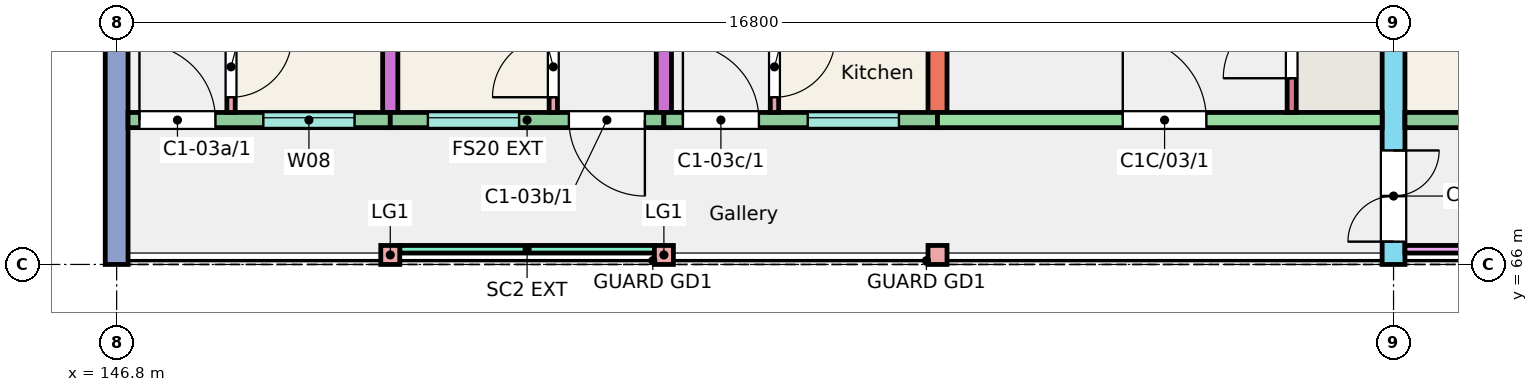
"""IFC4 building model, lengths in metres.
Left out: names, types, materials, properties, quantities, classifications, styles, units other than length and angle.
Written with IfcOpenShell. Run it as: python <this file> out.ifc"""

import sys

from ifc_helpers import new_model, si_unit, direction, frame, frame_2d, origin, origin_2d, place, context, subcontext, project, spatial, rectangle, extrude, element, fill, save


model = new_model("IFC4")
c1 = context("Model", 3, precision=1e-05, world=origin(), true_north=direction((0.0, 1.0)))
c2 = subcontext(c1, "Body", "Model", "MODEL_VIEW")
j1 = project(units=[si_unit("LENGTHUNIT", "METRE"), si_unit("PLANEANGLEUNIT", "RADIAN")], contexts=[c1])
p1 = place(None, origin())
s1 = spatial("IfcSite", under=j1, at=p1, CompositionType="ELEMENT")
p2 = place(p1, origin())
s2 = spatial("IfcBuilding", under=s1, at=p2, CompositionType="ELEMENT")
p3 = place(p2, frame((0.0, 0.0, 9.0)))
s3 = spatial("IfcBuildingStorey", under=s2, at=p3, CompositionType="ELEMENT", Elevation=9.0)
p4 = place(p3, frame((146.8, 66.0, 0.0), z_axis=(0.0, 0.0, 1.0), x_axis=(0.0, 1.0, 0.0)))
e1 = element("IfcWall", 1, at=p4, inside=s3, PredefinedType="SHEAR", context=c2, shape_type="SweptSolid", body=[
    extrude(rectangle(XDim=11.0, YDim=0.3, at=frame_2d((5.5, 0.0))), origin(), (0.0, 0.0, 1.0), 3.0),
])
p5 = place(p4, frame((7.805, 0.0, 0.9)))
e2 = element("IfcOpeningElement", 2, at=p5, cuts=e1, PredefinedType="OPENING", context=c2, shape_type="SweptSolid", body=[
    extrude(rectangle(XDim=1.8, YDim=1.5, at=frame_2d((0.9, 0.75))), frame((0.0, 0.16, 0.0), z_axis=(0.0, -1.0, 0.0), x_axis=(1.0, 0.0, 0.0)), (0.0, 0.0, 1.0), 0.32),
])
for number, where, z_axis, x_axis in (
    (3, (150.4, 68.0, 0.0), (0.0, 0.0, 1.0), (0.0, 1.0, 0.0)),
    (4, (154.0, 68.0, 0.0), (0.0, 0.0, 1.0), (0.0, 1.0, 0.0)),
):
    element("IfcWall", number, at=place(p3, frame(where, z_axis=z_axis, x_axis=x_axis)), inside=s3, PredefinedType="SHEAR", context=c2, shape_type="SweptSolid", body=[
        extrude(rectangle(XDim=9.0, YDim=0.2, at=frame_2d((4.5, 0.0))), origin(), (0.0, 0.0, 1.0), 3.0),
    ])
p6 = place(p3, frame((157.6, 68.0, 0.0), z_axis=(0.0, 0.0, 1.0), x_axis=(0.0, 1.0, 0.0)))
e5 = element("IfcWall", 5, at=p6, inside=s3, PredefinedType="SHEAR", context=c2, shape_type="SweptSolid", body=[
    extrude(rectangle(XDim=9.0, YDim=0.25, at=frame_2d((4.5, 0.0))), origin(), (0.0, 0.0, 1.0), 3.0),
])
p7 = place(p3, frame((163.6, 66.0, 0.0), z_axis=(0.0, 0.0, 1.0), x_axis=(0.0, 1.0, 0.0)))
e6 = element("IfcWall", 6, at=p7, inside=s3, PredefinedType="SHEAR", context=c2, shape_type="SweptSolid", body=[
    extrude(rectangle(XDim=11.0, YDim=0.3, at=frame_2d((5.5, 0.0))), origin(), (0.0, 0.0, 1.0), 3.0),
])
p8 = place(p7, frame((0.3, 0.0, 0.0)))
e7 = element("IfcOpeningElement", 7, at=p8, cuts=e6, PredefinedType="OPENING", context=c2, shape_type="SweptSolid", body=[
    extrude(rectangle(XDim=1.2, YDim=2.1, at=frame_2d((0.6, 1.05))), frame((0.0, 0.16, 0.0), z_axis=(0.0, -1.0, 0.0), x_axis=(1.0, 0.0, 0.0)), (0.0, 0.0, 1.0), 0.32),
])
p9 = place(p3, frame((146.95, 67.9, 0.0), z_axis=(0.0, 0.0, 1.0), x_axis=(1.0, 0.0, 0.0)))
e8 = element("IfcWall", 8, at=p9, inside=s3, PredefinedType="SOLIDWALL", context=c2, shape_type="SweptSolid", body=[
    extrude(rectangle(XDim=3.45, YDim=0.2, at=frame_2d((1.725, 0.0))), origin(), (0.0, 0.0, 1.0), 3.0),
])
p10 = place(p9, frame((1.78, 0.0, 1.1)))
e9 = element("IfcOpeningElement", 9, at=p10, cuts=e8, PredefinedType="OPENING", context=c2, shape_type="SweptSolid", body=[
    extrude(rectangle(XDim=1.2, YDim=1.3, at=frame_2d((0.6, 0.65))), frame((0.0, 0.11, 0.0), z_axis=(0.0, -1.0, 0.0), x_axis=(1.0, 0.0, 0.0)), (0.0, 0.0, 1.0), 0.22),
])
p11 = place(p9, frame((0.15, 0.0, 0.0)))
e10 = element("IfcOpeningElement", 10, at=p11, cuts=e8, PredefinedType="OPENING", context=c2, shape_type="SweptSolid", body=[
    extrude(rectangle(XDim=1.0, YDim=2.1, at=frame_2d((0.5, 1.05))), frame((0.0, 0.11, 0.0), z_axis=(0.0, -1.0, 0.0), x_axis=(1.0, 0.0, 0.0)), (0.0, 0.0, 1.0), 0.22),
])
p12 = place(p3, frame((150.4, 67.9, 0.0), z_axis=(0.0, 0.0, 1.0), x_axis=(1.0, 0.0, 0.0)))
e11 = element("IfcWall", 11, at=p12, inside=s3, PredefinedType="SOLIDWALL", context=c2, shape_type="SweptSolid", body=[
    extrude(rectangle(XDim=3.6, YDim=0.2, at=frame_2d((1.8, 0.0))), origin(), (0.0, 0.0, 1.0), 3.0),
])
p13 = place(p12, frame((0.495, 0.0, 1.1)))
e12 = element("IfcOpeningElement", 12, at=p13, cuts=e11, PredefinedType="OPENING", context=c2, shape_type="SweptSolid", body=[
    extrude(rectangle(XDim=1.2, YDim=1.3, at=frame_2d((0.6, 0.65))), frame((0.0, 0.11, 0.0), z_axis=(0.0, -1.0, 0.0), x_axis=(1.0, 0.0, 0.0)), (0.0, 0.0, 1.0), 0.22),
])
p14 = place(p12, frame((2.35, 0.0, 0.0)))
e13 = element("IfcOpeningElement", 13, at=p14, cuts=e11, PredefinedType="OPENING", context=c2, shape_type="SweptSolid", body=[
    extrude(rectangle(XDim=1.0, YDim=2.1, at=frame_2d((0.5, 1.05))), frame((0.0, 0.11, 0.0), z_axis=(0.0, -1.0, 0.0), x_axis=(1.0, 0.0, 0.0)), (0.0, 0.0, 1.0), 0.22),
])
p15 = place(p3, frame((154.0, 67.9, 0.0), z_axis=(0.0, 0.0, 1.0), x_axis=(1.0, 0.0, 0.0)))
e14 = element("IfcWall", 14, at=p15, inside=s3, PredefinedType="SOLIDWALL", context=c2, shape_type="SweptSolid", body=[
    extrude(rectangle(XDim=3.6, YDim=0.2, at=frame_2d((1.8, 0.0))), origin(), (0.0, 0.0, 1.0), 3.0),
])
p16 = place(p15, frame((1.893, 0.0, 1.1)))
e15 = element("IfcOpeningElement", 15, at=p16, cuts=e14, PredefinedType="OPENING", context=c2, shape_type="SweptSolid", body=[
    extrude(rectangle(XDim=1.2, YDim=1.3, at=frame_2d((0.6, 0.65))), frame((0.0, 0.11, 0.0), z_axis=(0.0, -1.0, 0.0), x_axis=(1.0, 0.0, 0.0)), (0.0, 0.0, 1.0), 0.22),
])
p17 = place(p15, frame((0.25, 0.0, 0.0)))
e16 = element("IfcOpeningElement", 16, at=p17, cuts=e14, PredefinedType="OPENING", context=c2, shape_type="SweptSolid", body=[
    extrude(rectangle(XDim=1.0, YDim=2.1, at=frame_2d((0.5, 1.05))), frame((0.0, 0.11, 0.0), z_axis=(0.0, -1.0, 0.0), x_axis=(1.0, 0.0, 0.0)), (0.0, 0.0, 1.0), 0.22),
])
p18 = place(p3, frame((157.6, 67.9, 0.0), z_axis=(0.0, 0.0, 1.0), x_axis=(1.0, 0.0, 0.0)))
e17 = element("IfcWall", 17, at=p18, inside=s3, PredefinedType="SHEAR", context=c2, shape_type="SweptSolid", body=[
    extrude(rectangle(XDim=5.85, YDim=0.2, at=frame_2d((2.925, 0.0))), origin(), (0.0, 0.0, 1.0), 3.0),
])
p19 = place(p18, frame((2.438, 0.0, 0.0)))
e18 = element("IfcOpeningElement", 18, at=p19, cuts=e17, PredefinedType="OPENING", context=c2, shape_type="SweptSolid", body=[
    extrude(rectangle(XDim=1.1, YDim=2.1, at=frame_2d((0.55, 1.05))), frame((0.0, 0.11, 0.0), z_axis=(0.0, -1.0, 0.0), x_axis=(1.0, 0.0, 0.0)), (0.0, 0.0, 1.0), 0.22),
])
p20 = place(p3, frame((162.26, 68.0, 0.0), z_axis=(0.0, 0.0, 1.0), x_axis=(0.0, 1.0, 0.0)))
e19 = element("IfcWall", 19, at=p20, inside=s3, PredefinedType="SHEAR", context=c2, shape_type="SweptSolid", body=[
    extrude(rectangle(XDim=1.72, YDim=0.12, at=frame_2d((0.86, 0.0))), origin(), (0.0, 0.0, 1.0), 3.0),
])
p21 = place(p20, frame((0.45, 0.0, 0.0)))
e20 = element("IfcOpeningElement", 20, at=p21, cuts=e19, PredefinedType="OPENING", context=c2, shape_type="SweptSolid", body=[
    extrude(rectangle(XDim=0.9, YDim=2.1, at=frame_2d((0.45, 1.05))), frame((0.0, 0.07, 0.0), z_axis=(0.0, -1.0, 0.0), x_axis=(1.0, 0.0, 0.0)), (0.0, 0.0, 1.0), 0.14),
])
p22 = place(p3, frame((163.75, 67.9, 0.0), z_axis=(0.0, 0.0, 1.0), x_axis=(1.0, 0.0, 0.0)))
e21 = element("IfcWall", 21, at=p22, inside=s3, PredefinedType="SOLIDWALL", context=c2, shape_type="SweptSolid", body=[
    extrude(rectangle(XDim=3.45, YDim=0.2, at=frame_2d((1.725, 0.0))), origin(), (0.0, 0.0, 1.0), 3.0),
])
p23 = place(p22, frame((0.925, 0.0, 0.9)))
e22 = element("IfcOpeningElement", 22, at=p23, cuts=e21, PredefinedType="OPENING", context=c2, shape_type="SweptSolid", body=[
    extrude(rectangle(XDim=1.5, YDim=1.5, at=frame_2d((0.75, 0.75))), frame((0.0, 0.11, 0.0), z_axis=(0.0, -1.0, 0.0), x_axis=(1.0, 0.0, 0.0)), (0.0, 0.0, 1.0), 0.22),
])
for number, where, z_axis, x_axis in (
    (23, (150.4, 66.125, 0.0), (0.0, 0.0, 1.0), (1.0, 0.0, 0.0)),
    (24, (154.0, 66.125, 0.0), (0.0, 0.0, 1.0), (1.0, 0.0, 0.0)),
    (25, (157.6, 66.125, 0.0), (0.0, 0.0, 1.0), (1.0, 0.0, 0.0)),
):
    element("IfcColumn", number, at=place(p3, frame(where, z_axis=z_axis, x_axis=x_axis)), inside=s3, PredefinedType="COLUMN", context=c2, shape_type="SweptSolid", body=[
        extrude(rectangle(XDim=0.25, YDim=0.25, at=origin_2d()), origin(), (0.0, 0.0, 1.0), 3.0),
    ])
p24 = place(p3, frame((150.525, 66.2, 0.0), z_axis=(0.0, 0.0, 1.0), x_axis=(1.0, 0.0, 0.0)))
e26 = element("IfcWall", 26, at=p24, inside=s3, PredefinedType="SOLIDWALL", context=c2, shape_type="SweptSolid", body=[
    extrude(rectangle(XDim=3.35, YDim=0.1, at=frame_2d((1.675, 0.0))), origin(), (0.0, 0.0, 1.0), 2.45),
])
p25 = place(p3, frame((163.75, 66.2, 0.0), z_axis=(0.0, 0.0, 1.0), x_axis=(1.0, 0.0, 0.0)))
e27 = element("IfcWall", 27, at=p25, inside=s3, PredefinedType="SOLIDWALL", context=c2, shape_type="SweptSolid", body=[
    extrude(rectangle(XDim=3.325, YDim=0.1, at=frame_2d((1.663, 0.0))), origin(), (0.0, 0.0, 1.0), 2.45),
])
p26 = place(p3, frame((148.305, 68.0, 0.0), z_axis=(0.0, 0.0, 1.0), x_axis=(0.0, 1.0, 0.0)))
e28 = element("IfcWall", 28, at=p26, inside=s3, PredefinedType="PARTITIONING", context=c2, shape_type="SweptSolid", body=[
    extrude(rectangle(XDim=4.3, YDim=0.11, at=frame_2d((2.15, 0.0))), origin(), (0.0, 0.0, 1.0), 2.8),
])
p27 = place(p26, frame((0.2, 0.0, 0.0)))
e29 = element("IfcOpeningElement", 29, at=p27, cuts=e28, PredefinedType="OPENING", context=c2, shape_type="SweptSolid", body=[
    extrude(rectangle(XDim=0.8, YDim=2.1, at=frame_2d((0.4, 1.05))), frame((0.0, 0.065, 0.0), z_axis=(0.0, -1.0, 0.0), x_axis=(1.0, 0.0, 0.0)), (0.0, 0.0, 1.0), 0.13),
])
p28 = place(p26, frame((3.35, 0.0, 0.0)))
e30 = element("IfcOpeningElement", 30, at=p28, cuts=e28, PredefinedType="OPENING", context=c2, shape_type="SweptSolid", body=[
    extrude(rectangle(XDim=0.8, YDim=2.1, at=frame_2d((0.4, 1.05))), frame((0.0, 0.065, 0.0), z_axis=(0.0, -1.0, 0.0), x_axis=(1.0, 0.0, 0.0)), (0.0, 0.0, 1.0), 0.13),
])
p29 = place(p3, frame((152.545, 68.0, 0.0), z_axis=(0.0, 0.0, 1.0), x_axis=(0.0, 1.0, 0.0)))
e31 = element("IfcWall", 31, at=p29, inside=s3, PredefinedType="PARTITIONING", context=c2, shape_type="SweptSolid", body=[
    extrude(rectangle(XDim=4.5, YDim=0.11, at=frame_2d((2.25, 0.0))), origin(), (0.0, 0.0, 1.0), 2.8),
])
p30 = place(p29, frame((0.2, 0.0, 0.0)))
e32 = element("IfcOpeningElement", 32, at=p30, cuts=e31, PredefinedType="OPENING", context=c2, shape_type="SweptSolid", body=[
    extrude(rectangle(XDim=0.8, YDim=2.1, at=frame_2d((0.4, 1.05))), frame((0.0, 0.065, 0.0), z_axis=(0.0, -1.0, 0.0), x_axis=(1.0, 0.0, 0.0)), (0.0, 0.0, 1.0), 0.13),
])
p31 = place(p29, frame((3.55, 0.0, 0.0)))
e33 = element("IfcOpeningElement", 33, at=p31, cuts=e31, PredefinedType="OPENING", context=c2, shape_type="SweptSolid", body=[
    extrude(rectangle(XDim=0.8, YDim=2.1, at=frame_2d((0.4, 1.05))), frame((0.0, 0.065, 0.0), z_axis=(0.0, -1.0, 0.0), x_axis=(1.0, 0.0, 0.0)), (0.0, 0.0, 1.0), 0.13),
])
p32 = place(p3, frame((155.455, 68.0, 0.0), z_axis=(0.0, 0.0, 1.0), x_axis=(0.0, 1.0, 0.0)))
e34 = element("IfcWall", 34, at=p32, inside=s3, PredefinedType="PARTITIONING", context=c2, shape_type="SweptSolid", body=[
    extrude(rectangle(XDim=4.7, YDim=0.11, at=frame_2d((2.35, 0.0))), origin(), (0.0, 0.0, 1.0), 2.8),
])
p33 = place(p32, frame((0.2, 0.0, 0.0)))
e35 = element("IfcOpeningElement", 35, at=p33, cuts=e34, PredefinedType="OPENING", context=c2, shape_type="SweptSolid", body=[
    extrude(rectangle(XDim=0.8, YDim=2.1, at=frame_2d((0.4, 1.05))), frame((0.0, 0.065, 0.0), z_axis=(0.0, -1.0, 0.0), x_axis=(1.0, 0.0, 0.0)), (0.0, 0.0, 1.0), 0.13),
])
p34 = place(p32, frame((3.75, 0.0, 0.0)))
e36 = element("IfcOpeningElement", 36, at=p34, cuts=e34, PredefinedType="OPENING", context=c2, shape_type="SweptSolid", body=[
    extrude(rectangle(XDim=0.8, YDim=2.1, at=frame_2d((0.4, 1.05))), frame((0.0, 0.065, 0.0), z_axis=(0.0, -1.0, 0.0), x_axis=(1.0, 0.0, 0.0)), (0.0, 0.0, 1.0), 0.13),
])
p35 = place(p10, origin())
e37 = element("IfcWindow", 37, at=p35, inside=s3, PartitioningType="SINGLE_PANEL", PredefinedType="WINDOW", context=c2, shape_type="SweptSolid", body=[
    extrude(rectangle(XDim=1.2, YDim=1.3, at=frame_2d((0.6, 0.65))), frame((0.0, 0.06, 0.0), z_axis=(0.0, -1.0, 0.0), x_axis=(1.0, 0.0, 0.0)), (0.0, 0.0, 1.0), 0.06),
])
fill(e9, e37)
p36 = place(p13, origin())
e38 = element("IfcWindow", 38, at=p36, inside=s3, PartitioningType="SINGLE_PANEL", PredefinedType="WINDOW", context=c2, shape_type="SweptSolid", body=[
    extrude(rectangle(XDim=1.2, YDim=1.3, at=frame_2d((0.6, 0.65))), frame((0.0, 0.06, 0.0), z_axis=(0.0, -1.0, 0.0), x_axis=(1.0, 0.0, 0.0)), (0.0, 0.0, 1.0), 0.06),
])
fill(e12, e38)
p37 = place(p16, origin())
e39 = element("IfcWindow", 39, at=p37, inside=s3, PartitioningType="SINGLE_PANEL", PredefinedType="WINDOW", context=c2, shape_type="SweptSolid", body=[
    extrude(rectangle(XDim=1.2, YDim=1.3, at=frame_2d((0.6, 0.65))), frame((0.0, 0.06, 0.0), z_axis=(0.0, -1.0, 0.0), x_axis=(1.0, 0.0, 0.0)), (0.0, 0.0, 1.0), 0.06),
])
fill(e15, e39)
p38 = place(p11, origin())
e40 = element("IfcDoor", 40, at=p38, inside=s3, OperationType="SINGLE_SWING_LEFT", PredefinedType="DOOR", context=c2, shape_type="SweptSolid", body=[
    extrude(rectangle(XDim=1.0, YDim=2.1, at=frame_2d((0.5, 1.05))), frame((0.0, 0.025, 0.0), z_axis=(0.0, -1.0, 0.0), x_axis=(1.0, 0.0, 0.0)), (0.0, 0.0, 1.0), 0.05),
])
fill(e10, e40)
p39 = place(p27, origin())
e41 = element("IfcDoor", 41, at=p39, inside=s3, OperationType="SINGLE_SWING_RIGHT", PredefinedType="DOOR", context=c2, shape_type="SweptSolid", body=[
    extrude(rectangle(XDim=0.8, YDim=2.1, at=frame_2d((0.4, 1.05))), frame((0.0, 0.025, 0.0), z_axis=(0.0, -1.0, 0.0), x_axis=(1.0, 0.0, 0.0)), (0.0, 0.0, 1.0), 0.05),
])
fill(e29, e41)
p40 = place(p14, origin())
e42 = element("IfcDoor", 42, at=p40, inside=s3, OperationType="SINGLE_SWING_RIGHT", PredefinedType="DOOR", context=c2, shape_type="SweptSolid", body=[
    extrude(rectangle(XDim=1.0, YDim=2.1, at=frame_2d((0.5, 1.05))), frame((0.0, 0.025, 0.0), z_axis=(0.0, -1.0, 0.0), x_axis=(1.0, 0.0, 0.0)), (0.0, 0.0, 1.0), 0.05),
])
fill(e13, e42)
p41 = place(p30, origin())
e43 = element("IfcDoor", 43, at=p41, inside=s3, OperationType="SINGLE_SWING_LEFT", PredefinedType="DOOR", context=c2, shape_type="SweptSolid", body=[
    extrude(rectangle(XDim=0.8, YDim=2.1, at=frame_2d((0.4, 1.05))), frame((0.0, 0.025, 0.0), z_axis=(0.0, -1.0, 0.0), x_axis=(1.0, 0.0, 0.0)), (0.0, 0.0, 1.0), 0.05),
])
fill(e32, e43)
p42 = place(p17, origin())
e44 = element("IfcDoor", 44, at=p42, inside=s3, OperationType="SINGLE_SWING_LEFT", PredefinedType="DOOR", context=c2, shape_type="SweptSolid", body=[
    extrude(rectangle(XDim=1.0, YDim=2.1, at=frame_2d((0.5, 1.05))), frame((0.0, 0.025, 0.0), z_axis=(0.0, -1.0, 0.0), x_axis=(1.0, 0.0, 0.0)), (0.0, 0.0, 1.0), 0.05),
])
fill(e16, e44)
p43 = place(p33, origin())
e45 = element("IfcDoor", 45, at=p43, inside=s3, OperationType="SINGLE_SWING_RIGHT", PredefinedType="DOOR", context=c2, shape_type="SweptSolid", body=[
    extrude(rectangle(XDim=0.8, YDim=2.1, at=frame_2d((0.4, 1.05))), frame((0.0, 0.025, 0.0), z_axis=(0.0, -1.0, 0.0), x_axis=(1.0, 0.0, 0.0)), (0.0, 0.0, 1.0), 0.05),
])
fill(e35, e45)
p44 = place(p19, origin())
e46 = element("IfcDoor", 46, at=p44, inside=s3, OperationType="SINGLE_SWING_LEFT", PredefinedType="DOOR", context=c2, shape_type="SweptSolid", body=[
    extrude(rectangle(XDim=1.1, YDim=2.1, at=frame_2d((0.55, 1.05))), frame((0.0, 0.025, 0.0), z_axis=(0.0, -1.0, 0.0), x_axis=(1.0, 0.0, 0.0)), (0.0, 0.0, 1.0), 0.05),
])
fill(e18, e46)
p45 = place(p21, origin())
e47 = element("IfcDoor", 47, at=p45, inside=s3, OperationType="SINGLE_SWING_LEFT", PredefinedType="DOOR", context=c2, shape_type="SweptSolid", body=[
    extrude(rectangle(XDim=0.9, YDim=2.1, at=frame_2d((0.45, 1.05))), frame((0.0, 0.025, 0.0), z_axis=(0.0, -1.0, 0.0), x_axis=(1.0, 0.0, 0.0)), (0.0, 0.0, 1.0), 0.05),
])
fill(e20, e47)
p46 = place(p8, origin())
e48 = element("IfcDoor", 48, at=p46, inside=s3, OperationType="DOUBLE_DOOR_SINGLE_SWING", PredefinedType="DOOR", context=c2, shape_type="SweptSolid", body=[
    extrude(rectangle(XDim=1.2, YDim=2.1, at=frame_2d((0.6, 1.05))), frame((0.0, 0.025, 0.0), z_axis=(0.0, -1.0, 0.0), x_axis=(1.0, 0.0, 0.0)), (0.0, 0.0, 1.0), 0.05),
])
fill(e7, e48)
save(model, sys.argv[1])
